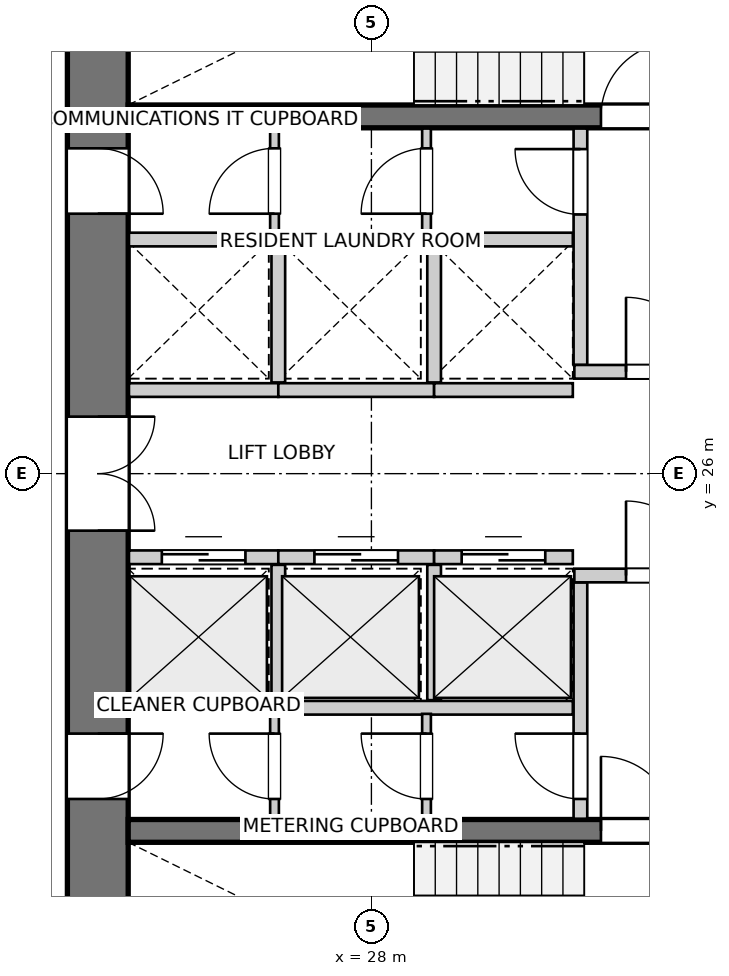
"""IFC4 building model, lengths in metres.
Left out: names, types, materials, properties, quantities, classifications, styles, units other than length and angle.
Written with IfcOpenShell. Run it as: python <this file> out.ifc"""

import sys

from ifc_helpers import new_model, si_unit, direction, frame, frame_2d, origin, place, context, subcontext, project, spatial, rectangle, extrude, source, transform, mapped, element, fill, save


model = new_model("IFC4")
c1 = context("Model", 3, precision=1e-05, world=origin(), true_north=direction((0.0, 1.0)))
c2 = subcontext(c1, "Body", "Model", "MODEL_VIEW")
j1 = project(units=[si_unit("LENGTHUNIT", "METRE"), si_unit("PLANEANGLEUNIT", "RADIAN")], contexts=[c1])
p1 = place(None, origin())
s1 = spatial("IfcSite", under=j1, at=p1, CompositionType="ELEMENT")
p2 = place(p1, origin())
s2 = spatial("IfcBuilding", under=s1, at=p2, CompositionType="ELEMENT")
p3 = place(p2, frame((0.0, 0.0, 33.4)))
s3 = spatial("IfcBuildingStorey", under=s2, at=p3, CompositionType="ELEMENT", Elevation=33.4)
p4 = place(p3, frame((24.4, 33.8, 0.0), z_axis=(0.0, 0.0, 1.0), x_axis=(0.0, -1.0, 0.0)))
e1 = element("IfcWall", 1, at=p4, inside=s3, PredefinedType="SHEAR", context=c2, shape_type="SweptSolid", body=[
    extrude(rectangle(XDim=15.6, YDim=0.8, at=frame_2d((7.8, 0.0))), origin(), (0.0, 0.0, 1.0), 2.94),
])
p5 = place(p4, frame((7.05, 0.0, 0.0)))
e2 = element("IfcOpeningElement", 2, at=p5, cuts=e1, PredefinedType="OPENING", context=c2, shape_type="SweptSolid", body=[
    extrude(rectangle(XDim=1.5, YDim=2.15, at=frame_2d((0.75, 1.075))), frame((0.0, 0.41, 0.0), z_axis=(0.0, -1.0, 0.0), x_axis=(1.0, 0.0, 0.0)), (0.0, 0.0, 1.0), 0.82),
])
p6 = place(p4, frame((3.52, 0.0, 0.0)))
e3 = element("IfcOpeningElement", 3, at=p6, cuts=e1, PredefinedType="OPENING", context=c2, shape_type="SweptSolid", body=[
    extrude(rectangle(XDim=0.86, YDim=2.05, at=frame_2d((0.43, 1.025))), frame((0.0, 0.41, 0.0), z_axis=(0.0, -1.0, 0.0), x_axis=(1.0, 0.0, 0.0)), (0.0, 0.0, 1.0), 0.82),
])
p7 = place(p4, frame((11.22, 0.0, 0.0)))
e4 = element("IfcOpeningElement", 4, at=p7, cuts=e1, PredefinedType="OPENING", context=c2, shape_type="SweptSolid", body=[
    extrude(rectangle(XDim=0.86, YDim=2.05, at=frame_2d((0.43, 1.025))), frame((0.0, 0.41, 0.0), z_axis=(0.0, -1.0, 0.0), x_axis=(1.0, 0.0, 0.0)), (0.0, 0.0, 1.0), 0.82),
])
p8 = place(p3, frame((24.8, 21.3, 0.0), z_axis=(0.0, 0.0, 1.0), x_axis=(1.0, 0.0, 0.0)))
e5 = element("IfcWall", 5, at=p8, inside=s3, PredefinedType="SHEAR", context=c2, shape_type="SweptSolid", body=[
    extrude(rectangle(XDim=11.1, YDim=0.3, at=frame_2d((5.55, 0.0))), origin(), (0.0, 0.0, 1.0), 2.94),
])
p9 = place(p8, frame((6.22, 0.0, 0.0)))
e6 = element("IfcOpeningElement", 6, at=p9, cuts=e5, PredefinedType="OPENING", context=c2, shape_type="SweptSolid", body=[
    extrude(rectangle(XDim=0.98, YDim=2.15, at=frame_2d((0.49, 1.075))), frame((0.0, 0.16, 0.0), z_axis=(0.0, -1.0, 0.0), x_axis=(1.0, 0.0, 0.0)), (0.0, 0.0, 1.0), 0.32),
])
p10 = place(p8, frame((9.15, 0.0, 0.0)))
e7 = element("IfcOpeningElement", 7, at=p10, cuts=e5, PredefinedType="OPENING", context=c2, shape_type="SweptSolid", body=[
    extrude(rectangle(XDim=1.15, YDim=2.15, at=frame_2d((0.575, 1.075))), frame((0.0, 0.16, 0.0), z_axis=(0.0, -1.0, 0.0), x_axis=(1.0, 0.0, 0.0)), (0.0, 0.0, 1.0), 0.32),
])
p11 = place(p3, frame((24.8, 30.7, 0.0), z_axis=(0.0, 0.0, 1.0), x_axis=(1.0, 0.0, 0.0)))
e8 = element("IfcWall", 8, at=p11, inside=s3, PredefinedType="SHEAR", context=c2, shape_type="SweptSolid", body=[
    extrude(rectangle(XDim=11.1, YDim=0.3, at=frame_2d((5.55, 0.0))), origin(), (0.0, 0.0, 1.0), 2.94),
])
p12 = place(p11, frame((6.22, 0.0, 0.0)))
e9 = element("IfcOpeningElement", 9, at=p12, cuts=e8, PredefinedType="OPENING", context=c2, shape_type="SweptSolid", body=[
    extrude(rectangle(XDim=0.98, YDim=2.15, at=frame_2d((0.49, 1.075))), frame((0.0, 0.16, 0.0), z_axis=(0.0, -1.0, 0.0), x_axis=(1.0, 0.0, 0.0)), (0.0, 0.0, 1.0), 0.32),
])
p13 = place(p11, frame((9.15, 0.0, 0.0)))
e10 = element("IfcOpeningElement", 10, at=p13, cuts=e8, PredefinedType="OPENING", context=c2, shape_type="SweptSolid", body=[
    extrude(rectangle(XDim=1.15, YDim=2.15, at=frame_2d((0.575, 1.075))), frame((0.0, 0.16, 0.0), z_axis=(0.0, -1.0, 0.0), x_axis=(1.0, 0.0, 0.0)), (0.0, 0.0, 1.0), 0.32),
])
p14 = place(p3, frame((30.75, 21.46, 0.0), z_axis=(0.0, 0.0, 1.0), x_axis=(0.0, 1.0, 0.0)))
e11 = element("IfcWall", 11, at=p14, inside=s3, PredefinedType="PARTITIONING", context=c2, shape_type="SweptSolid", body=[
    extrude(rectangle(XDim=3.11, YDim=0.18, at=frame_2d((1.555, 0.0))), origin(), (0.0, 0.0, 1.0), 2.94),
])
p15 = place(p14, frame((0.26, 0.0, 0.0)))
e12 = element("IfcOpeningElement", 12, at=p15, cuts=e11, PredefinedType="OPENING", context=c2, shape_type="SweptSolid", body=[
    extrude(rectangle(XDim=0.86, YDim=2.05, at=frame_2d((0.43, 1.025))), frame((0.0, 0.1, 0.0), z_axis=(0.0, -1.0, 0.0), x_axis=(1.0, 0.0, 0.0)), (0.0, 0.0, 1.0), 0.2),
])
p16 = place(p3, frame((30.67, 24.66, 0.0), z_axis=(0.0, 0.0, 1.0), x_axis=(1.0, 0.0, 0.0)))
e13 = element("IfcWall", 13, at=p16, inside=s3, PredefinedType="PARTITIONING", context=c2, shape_type="SweptSolid", body=[
    extrude(rectangle(XDim=5.22, YDim=0.18, at=frame_2d((2.61, 0.0))), origin(), (0.0, 0.0, 1.0), 2.94),
])
p17 = place(p16, frame((0.68, 0.0, 0.0)))
e14 = element("IfcOpeningElement", 14, at=p17, cuts=e13, PredefinedType="OPENING", context=c2, shape_type="SweptSolid", body=[
    extrude(rectangle(XDim=0.98, YDim=2.15, at=frame_2d((0.49, 1.075))), frame((0.0, 0.1, 0.0), z_axis=(0.0, -1.0, 0.0), x_axis=(1.0, 0.0, 0.0)), (0.0, 0.0, 1.0), 0.2),
])
p18 = place(p3, frame((30.75, 27.43, 0.0), z_axis=(0.0, 0.0, 1.0), x_axis=(0.0, 1.0, 0.0)))
e15 = element("IfcWall", 15, at=p18, inside=s3, PredefinedType="PARTITIONING", context=c2, shape_type="SweptSolid", body=[
    extrude(rectangle(XDim=3.11, YDim=0.18, at=frame_2d((1.555, 0.0))), origin(), (0.0, 0.0, 1.0), 2.94),
])
p19 = place(p18, frame((1.98, 0.0, 0.0)))
e16 = element("IfcOpeningElement", 16, at=p19, cuts=e15, PredefinedType="OPENING", context=c2, shape_type="SweptSolid", body=[
    extrude(rectangle(XDim=0.86, YDim=2.05, at=frame_2d((0.43, 1.025))), frame((0.0, 0.1, 0.0), z_axis=(0.0, -1.0, 0.0), x_axis=(1.0, 0.0, 0.0)), (0.0, 0.0, 1.0), 0.2),
])
p20 = place(p3, frame((30.67, 27.34, 0.0), z_axis=(0.0, 0.0, 1.0), x_axis=(1.0, 0.0, 0.0)))
e17 = element("IfcWall", 17, at=p20, inside=s3, PredefinedType="PARTITIONING", context=c2, shape_type="SweptSolid", body=[
    extrude(rectangle(XDim=5.22, YDim=0.18, at=frame_2d((2.61, 0.0))), origin(), (0.0, 0.0, 1.0), 2.94),
])
p21 = place(p20, frame((0.68, 0.0, 0.0)))
e18 = element("IfcOpeningElement", 18, at=p21, cuts=e17, PredefinedType="OPENING", context=c2, shape_type="SweptSolid", body=[
    extrude(rectangle(XDim=0.98, YDim=2.15, at=frame_2d((0.49, 1.075))), frame((0.0, 0.1, 0.0), z_axis=(0.0, -1.0, 0.0), x_axis=(1.0, 0.0, 0.0)), (0.0, 0.0, 1.0), 0.2),
])
p22 = place(p3, frame((24.81, 22.92, 0.0), z_axis=(0.0, 0.0, 1.0), x_axis=(1.0, 0.0, 0.0)))
e19 = element("IfcWall", 19, at=p22, inside=s3, PredefinedType="PARTITIONING", context=c2, shape_type="SweptSolid", body=[
    extrude(rectangle(XDim=5.84, YDim=0.18, at=frame_2d((2.92, 0.0))), origin(), (0.0, 0.0, 1.0), 2.94),
])
p23 = place(p3, frame((24.81, 24.9, 0.0), z_axis=(0.0, 0.0, 1.0), x_axis=(1.0, 0.0, 0.0)))
e20 = element("IfcWall", 20, at=p23, inside=s3, PredefinedType="PARTITIONING", context=c2, shape_type="SweptSolid", body=[
    extrude(rectangle(XDim=1.965, YDim=0.18, at=frame_2d((0.982, 0.0))), origin(), (0.0, 0.0, 1.0), 2.94),
])
p24 = place(p23, frame((0.433, 0.0, 0.0)))
e21 = element("IfcOpeningElement", 21, at=p24, cuts=e20, PredefinedType="OPENING", context=c2, shape_type="SweptSolid", body=[
    extrude(rectangle(XDim=1.1, YDim=2.15, at=frame_2d((0.55, 1.075))), frame((0.0, 0.1, 0.0), z_axis=(0.0, -1.0, 0.0), x_axis=(1.0, 0.0, 0.0)), (0.0, 0.0, 1.0), 0.2),
])
p25 = place(p3, frame((26.775, 24.9, 0.0), z_axis=(0.0, 0.0, 1.0), x_axis=(1.0, 0.0, 0.0)))
e22 = element("IfcWall", 22, at=p25, inside=s3, PredefinedType="PARTITIONING", context=c2, shape_type="SweptSolid", body=[
    extrude(rectangle(XDim=2.05, YDim=0.18, at=frame_2d((1.025, 0.0))), origin(), (0.0, 0.0, 1.0), 2.94),
])
p26 = place(p25, frame((0.475, 0.0, 0.0)))
e23 = element("IfcOpeningElement", 23, at=p26, cuts=e22, PredefinedType="OPENING", context=c2, shape_type="SweptSolid", body=[
    extrude(rectangle(XDim=1.1, YDim=2.15, at=frame_2d((0.55, 1.075))), frame((0.0, 0.1, 0.0), z_axis=(0.0, -1.0, 0.0), x_axis=(1.0, 0.0, 0.0)), (0.0, 0.0, 1.0), 0.2),
])
p27 = place(p3, frame((26.775, 23.02, 0.0), z_axis=(0.0, 0.0, 1.0), x_axis=(0.0, 1.0, 0.0)))
e24 = element("IfcWall", 24, at=p27, inside=s3, PredefinedType="PARTITIONING", context=c2, shape_type="SweptSolid", body=[
    extrude(rectangle(XDim=1.78, YDim=0.18, at=frame_2d((0.89, 0.0))), origin(), (0.0, 0.0, 1.0), 2.94),
])
p28 = place(p3, frame((28.825, 24.9, 0.0), z_axis=(0.0, 0.0, 1.0), x_axis=(1.0, 0.0, 0.0)))
e25 = element("IfcWall", 25, at=p28, inside=s3, PredefinedType="PARTITIONING", context=c2, shape_type="SweptSolid", body=[
    extrude(rectangle(XDim=1.825, YDim=0.18, at=frame_2d((0.913, 0.0))), origin(), (0.0, 0.0, 1.0), 2.94),
])
p29 = place(p28, frame((0.363, 0.0, 0.0)))
e26 = element("IfcOpeningElement", 26, at=p29, cuts=e25, PredefinedType="OPENING", context=c2, shape_type="SweptSolid", body=[
    extrude(rectangle(XDim=1.1, YDim=2.15, at=frame_2d((0.55, 1.075))), frame((0.0, 0.1, 0.0), z_axis=(0.0, -1.0, 0.0), x_axis=(1.0, 0.0, 0.0)), (0.0, 0.0, 1.0), 0.2),
])
p30 = place(p3, frame((28.825, 23.02, 0.0), z_axis=(0.0, 0.0, 1.0), x_axis=(0.0, 1.0, 0.0)))
e27 = element("IfcWall", 27, at=p30, inside=s3, PredefinedType="PARTITIONING", context=c2, shape_type="SweptSolid", body=[
    extrude(rectangle(XDim=1.78, YDim=0.18, at=frame_2d((0.89, 0.0))), origin(), (0.0, 0.0, 1.0), 2.94),
])
p31 = place(p3, frame((24.81, 29.08, 0.0), z_axis=(0.0, 0.0, 1.0), x_axis=(1.0, 0.0, 0.0)))
e28 = element("IfcWall", 28, at=p31, inside=s3, PredefinedType="PARTITIONING", context=c2, shape_type="SweptSolid", body=[
    extrude(rectangle(XDim=5.84, YDim=0.18, at=frame_2d((2.92, 0.0))), origin(), (0.0, 0.0, 1.0), 2.94),
])
p32 = place(p3, frame((24.81, 27.1, 0.0), z_axis=(0.0, 0.0, 1.0), x_axis=(1.0, 0.0, 0.0)))
e29 = element("IfcWall", 29, at=p32, inside=s3, PredefinedType="PARTITIONING", context=c2, shape_type="SweptSolid", body=[
    extrude(rectangle(XDim=1.965, YDim=0.18, at=frame_2d((0.982, 0.0))), origin(), (0.0, 0.0, 1.0), 2.94),
])
p33 = place(p3, frame((26.775, 27.1, 0.0), z_axis=(0.0, 0.0, 1.0), x_axis=(1.0, 0.0, 0.0)))
e30 = element("IfcWall", 30, at=p33, inside=s3, PredefinedType="PARTITIONING", context=c2, shape_type="SweptSolid", body=[
    extrude(rectangle(XDim=2.05, YDim=0.18, at=frame_2d((1.025, 0.0))), origin(), (0.0, 0.0, 1.0), 2.94),
])
p34 = place(p3, frame((26.775, 27.2, 0.0), z_axis=(0.0, 0.0, 1.0), x_axis=(0.0, 1.0, 0.0)))
e31 = element("IfcWall", 31, at=p34, inside=s3, PredefinedType="PARTITIONING", context=c2, shape_type="SweptSolid", body=[
    extrude(rectangle(XDim=1.78, YDim=0.18, at=frame_2d((0.89, 0.0))), origin(), (0.0, 0.0, 1.0), 2.94),
])
p35 = place(p3, frame((28.825, 27.1, 0.0), z_axis=(0.0, 0.0, 1.0), x_axis=(1.0, 0.0, 0.0)))
e32 = element("IfcWall", 32, at=p35, inside=s3, PredefinedType="PARTITIONING", context=c2, shape_type="SweptSolid", body=[
    extrude(rectangle(XDim=1.825, YDim=0.18, at=frame_2d((0.913, 0.0))), origin(), (0.0, 0.0, 1.0), 2.94),
])
p36 = place(p3, frame((28.825, 27.2, 0.0), z_axis=(0.0, 0.0, 1.0), x_axis=(0.0, 1.0, 0.0)))
e33 = element("IfcWall", 33, at=p36, inside=s3, PredefinedType="PARTITIONING", context=c2, shape_type="SweptSolid", body=[
    extrude(rectangle(XDim=1.78, YDim=0.18, at=frame_2d((0.89, 0.0))), origin(), (0.0, 0.0, 1.0), 2.94),
])
p37 = place(p3, frame((26.725, 21.46, 0.0), z_axis=(0.0, 0.0, 1.0), x_axis=(0.0, 1.0, 0.0)))
e34 = element("IfcWall", 34, at=p37, inside=s3, PredefinedType="PARTITIONING", context=c2, shape_type="SweptSolid", body=[
    extrude(rectangle(XDim=1.38, YDim=0.115, at=frame_2d((0.69, 0.0))), origin(), (0.0, 0.0, 1.0), 2.94),
])
p38 = place(p37, frame((0.26, 0.0, 0.0)))
e35 = element("IfcOpeningElement", 35, at=p38, cuts=e34, PredefinedType="OPENING", context=c2, shape_type="SweptSolid", body=[
    extrude(rectangle(XDim=0.86, YDim=2.05, at=frame_2d((0.43, 1.025))), frame((0.0, 0.067, 0.0), z_axis=(0.0, -1.0, 0.0), x_axis=(1.0, 0.0, 0.0)), (0.0, 0.0, 1.0), 0.135),
])
p39 = place(p3, frame((26.725, 29.16, 0.0), z_axis=(0.0, 0.0, 1.0), x_axis=(0.0, 1.0, 0.0)))
e36 = element("IfcWall", 36, at=p39, inside=s3, PredefinedType="PARTITIONING", context=c2, shape_type="SweptSolid", body=[
    extrude(rectangle(XDim=1.38, YDim=0.115, at=frame_2d((0.69, 0.0))), origin(), (0.0, 0.0, 1.0), 2.94),
])
p40 = place(p39, frame((0.26, 0.0, 0.0)))
e37 = element("IfcOpeningElement", 37, at=p40, cuts=e36, PredefinedType="OPENING", context=c2, shape_type="SweptSolid", body=[
    extrude(rectangle(XDim=0.86, YDim=2.05, at=frame_2d((0.43, 1.025))), frame((0.0, 0.067, 0.0), z_axis=(0.0, -1.0, 0.0), x_axis=(1.0, 0.0, 0.0)), (0.0, 0.0, 1.0), 0.135),
])
p41 = place(p3, frame((28.725, 21.46, 0.0), z_axis=(0.0, 0.0, 1.0), x_axis=(0.0, 1.0, 0.0)))
e38 = element("IfcWall", 38, at=p41, inside=s3, PredefinedType="PARTITIONING", context=c2, shape_type="SweptSolid", body=[
    extrude(rectangle(XDim=1.38, YDim=0.115, at=frame_2d((0.69, 0.0))), origin(), (0.0, 0.0, 1.0), 2.94),
])
p42 = place(p41, frame((0.26, 0.0, 0.0)))
e39 = element("IfcOpeningElement", 39, at=p42, cuts=e38, PredefinedType="OPENING", context=c2, shape_type="SweptSolid", body=[
    extrude(rectangle(XDim=0.86, YDim=2.05, at=frame_2d((0.43, 1.025))), frame((0.0, 0.067, 0.0), z_axis=(0.0, -1.0, 0.0), x_axis=(1.0, 0.0, 0.0)), (0.0, 0.0, 1.0), 0.135),
])
p43 = place(p3, frame((28.725, 29.16, 0.0), z_axis=(0.0, 0.0, 1.0), x_axis=(0.0, 1.0, 0.0)))
e40 = element("IfcWall", 40, at=p43, inside=s3, PredefinedType="PARTITIONING", context=c2, shape_type="SweptSolid", body=[
    extrude(rectangle(XDim=1.38, YDim=0.115, at=frame_2d((0.69, 0.0))), origin(), (0.0, 0.0, 1.0), 2.94),
])
p44 = place(p43, frame((0.26, 0.0, 0.0)))
e41 = element("IfcOpeningElement", 41, at=p44, cuts=e40, PredefinedType="OPENING", context=c2, shape_type="SweptSolid", body=[
    extrude(rectangle(XDim=0.86, YDim=2.05, at=frame_2d((0.43, 1.025))), frame((0.0, 0.067, 0.0), z_axis=(0.0, -1.0, 0.0), x_axis=(1.0, 0.0, 0.0)), (0.0, 0.0, 1.0), 0.135),
])
m1 = source(origin(), c2, "Body", "SweptSolid", [
    extrude(rectangle(XDim=0.98, YDim=2.15, at=frame_2d((0.49, 1.075))), frame((0.0, 0.025, 0.0), z_axis=(0.0, -1.0, 0.0), x_axis=(1.0, 0.0, 0.0)), (0.0, 0.0, 1.0), 0.05),
])
p45 = place(p9, origin())
e42 = element("IfcDoor", 42, at=p45, inside=s3, OperationType="SINGLE_SWING_LEFT", PredefinedType="DOOR", context=c2, shape_type="MappedRepresentation", body=[
    mapped(m1, transform((0.0, 0.0, 0.0), x_axis=(1.0, 0.0, 0.0), y_axis=(0.0, 1.0, 0.0), z_axis=(0.0, 0.0, 1.0), scale=1.0)),
])
fill(e6, e42)
p46 = place(p12, origin())
e43 = element("IfcDoor", 43, at=p46, inside=s3, OperationType="SINGLE_SWING_RIGHT", PredefinedType="DOOR", context=c2, shape_type="MappedRepresentation", body=[
    mapped(m1, transform((0.0, 0.0, 0.0), x_axis=(1.0, 0.0, 0.0), y_axis=(0.0, 1.0, 0.0), z_axis=(0.0, 0.0, 1.0), scale=1.0)),
])
fill(e9, e43)
m2 = source(origin(), c2, "Body", "SweptSolid", [
    extrude(rectangle(XDim=1.5, YDim=2.15, at=frame_2d((0.75, 1.075))), frame((0.0, 0.025, 0.0), z_axis=(0.0, -1.0, 0.0), x_axis=(1.0, 0.0, 0.0)), (0.0, 0.0, 1.0), 0.05),
])
p47 = place(p5, origin())
e44 = element("IfcDoor", 44, at=p47, inside=s3, OperationType="DOUBLE_DOOR_SINGLE_SWING", PredefinedType="DOOR", context=c2, shape_type="MappedRepresentation", body=[
    mapped(m2, transform((0.0, 0.0, 0.0), x_axis=(1.0, 0.0, 0.0), y_axis=(0.0, 1.0, 0.0), z_axis=(0.0, 0.0, 1.0), scale=1.0)),
])
fill(e2, e44)
m3 = source(origin(), c2, "Body", "SweptSolid", [
    extrude(rectangle(XDim=0.86, YDim=2.05, at=frame_2d((0.43, 1.025))), frame((0.0, 0.025, 0.0), z_axis=(0.0, -1.0, 0.0), x_axis=(1.0, 0.0, 0.0)), (0.0, 0.0, 1.0), 0.05),
])
p48 = place(p6, origin())
e45 = element("IfcDoor", 45, at=p48, inside=s3, OperationType="SINGLE_SWING_RIGHT", PredefinedType="DOOR", context=c2, shape_type="MappedRepresentation", body=[
    mapped(m3, transform((0.0, 0.0, 0.0), x_axis=(1.0, 0.0, 0.0), y_axis=(0.0, 1.0, 0.0), z_axis=(0.0, 0.0, 1.0), scale=1.0)),
])
fill(e3, e45)
p49 = place(p7, origin())
e46 = element("IfcDoor", 46, at=p49, inside=s3, OperationType="SINGLE_SWING_LEFT", PredefinedType="DOOR", context=c2, shape_type="MappedRepresentation", body=[
    mapped(m3, transform((0.0, 0.0, 0.0), x_axis=(1.0, 0.0, 0.0), y_axis=(0.0, 1.0, 0.0), z_axis=(0.0, 0.0, 1.0), scale=1.0)),
])
fill(e4, e46)
p50 = place(p15, origin())
e47 = element("IfcDoor", 47, at=p50, inside=s3, OperationType="SINGLE_SWING_RIGHT", PredefinedType="DOOR", context=c2, shape_type="MappedRepresentation", body=[
    mapped(m3, transform((0.0, 0.0, 0.0), x_axis=(1.0, 0.0, 0.0), y_axis=(0.0, 1.0, 0.0), z_axis=(0.0, 0.0, 1.0), scale=1.0)),
])
fill(e12, e47)
p51 = place(p17, origin())
e48 = element("IfcDoor", 48, at=p51, inside=s3, OperationType="SINGLE_SWING_LEFT", PredefinedType="DOOR", context=c2, shape_type="MappedRepresentation", body=[
    mapped(m1, transform((0.0, 0.0, 0.0), x_axis=(1.0, 0.0, 0.0), y_axis=(0.0, 1.0, 0.0), z_axis=(0.0, 0.0, 1.0), scale=1.0)),
])
fill(e14, e48)
p52 = place(p19, origin())
e49 = element("IfcDoor", 49, at=p52, inside=s3, OperationType="SINGLE_SWING_RIGHT", PredefinedType="DOOR", context=c2, shape_type="MappedRepresentation", body=[
    mapped(m3, transform((0.0, 0.0, 0.0), x_axis=(1.0, 0.0, 0.0), y_axis=(0.0, 1.0, 0.0), z_axis=(0.0, 0.0, 1.0), scale=1.0)),
])
fill(e16, e49)
p53 = place(p21, origin())
e50 = element("IfcDoor", 50, at=p53, inside=s3, OperationType="SINGLE_SWING_LEFT", PredefinedType="DOOR", context=c2, shape_type="MappedRepresentation", body=[
    mapped(m1, transform((0.0, 0.0, 0.0), x_axis=(1.0, 0.0, 0.0), y_axis=(0.0, 1.0, 0.0), z_axis=(0.0, 0.0, 1.0), scale=1.0)),
])
fill(e18, e50)
m4 = source(origin(), c2, "Body", "SweptSolid", [
    extrude(rectangle(XDim=1.1, YDim=2.15, at=frame_2d((0.55, 1.075))), frame((0.0, 0.025, 0.0), z_axis=(0.0, -1.0, 0.0), x_axis=(1.0, 0.0, 0.0)), (0.0, 0.0, 1.0), 0.05),
])
p54 = place(p24, origin())
e51 = element("IfcDoor", 51, at=p54, inside=s3, OperationType="DOUBLE_DOOR_SLIDING", PredefinedType="DOOR", context=c2, shape_type="MappedRepresentation", body=[
    mapped(m4, transform((0.0, 0.0, 0.0), x_axis=(1.0, 0.0, 0.0), y_axis=(0.0, 1.0, 0.0), z_axis=(0.0, 0.0, 1.0), scale=1.0)),
])
fill(e21, e51)
p55 = place(p26, origin())
e52 = element("IfcDoor", 52, at=p55, inside=s3, OperationType="DOUBLE_DOOR_SLIDING", PredefinedType="DOOR", context=c2, shape_type="MappedRepresentation", body=[
    mapped(m4, transform((0.0, 0.0, 0.0), x_axis=(1.0, 0.0, 0.0), y_axis=(0.0, 1.0, 0.0), z_axis=(0.0, 0.0, 1.0), scale=1.0)),
])
fill(e23, e52)
p56 = place(p29, origin())
e53 = element("IfcDoor", 53, at=p56, inside=s3, OperationType="DOUBLE_DOOR_SLIDING", PredefinedType="DOOR", context=c2, shape_type="MappedRepresentation", body=[
    mapped(m4, transform((0.0, 0.0, 0.0), x_axis=(1.0, 0.0, 0.0), y_axis=(0.0, 1.0, 0.0), z_axis=(0.0, 0.0, 1.0), scale=1.0)),
])
fill(e26, e53)
p57 = place(p38, origin())
e54 = element("IfcDoor", 54, at=p57, inside=s3, OperationType="SINGLE_SWING_RIGHT", PredefinedType="DOOR", context=c2, shape_type="MappedRepresentation", body=[
    mapped(m3, transform((0.0, 0.0, 0.0), x_axis=(1.0, 0.0, 0.0), y_axis=(0.0, 1.0, 0.0), z_axis=(0.0, 0.0, 1.0), scale=1.0)),
])
fill(e35, e54)
p58 = place(p40, origin())
e55 = element("IfcDoor", 55, at=p58, inside=s3, OperationType="SINGLE_SWING_LEFT", PredefinedType="DOOR", context=c2, shape_type="MappedRepresentation", body=[
    mapped(m3, transform((0.0, 0.0, 0.0), x_axis=(1.0, 0.0, 0.0), y_axis=(0.0, 1.0, 0.0), z_axis=(0.0, 0.0, 1.0), scale=1.0)),
])
fill(e37, e55)
p59 = place(p42, origin())
e56 = element("IfcDoor", 56, at=p59, inside=s3, OperationType="SINGLE_SWING_RIGHT", PredefinedType="DOOR", context=c2, shape_type="MappedRepresentation", body=[
    mapped(m3, transform((0.0, 0.0, 0.0), x_axis=(1.0, 0.0, 0.0), y_axis=(0.0, 1.0, 0.0), z_axis=(0.0, 0.0, 1.0), scale=1.0)),
])
fill(e39, e56)
p60 = place(p44, origin())
e57 = element("IfcDoor", 57, at=p60, inside=s3, OperationType="SINGLE_SWING_LEFT", PredefinedType="DOOR", context=c2, shape_type="MappedRepresentation", body=[
    mapped(m3, transform((0.0, 0.0, 0.0), x_axis=(1.0, 0.0, 0.0), y_axis=(0.0, 1.0, 0.0), z_axis=(0.0, 0.0, 1.0), scale=1.0)),
])
fill(e41, e57)
save(model, sys.argv[1])
